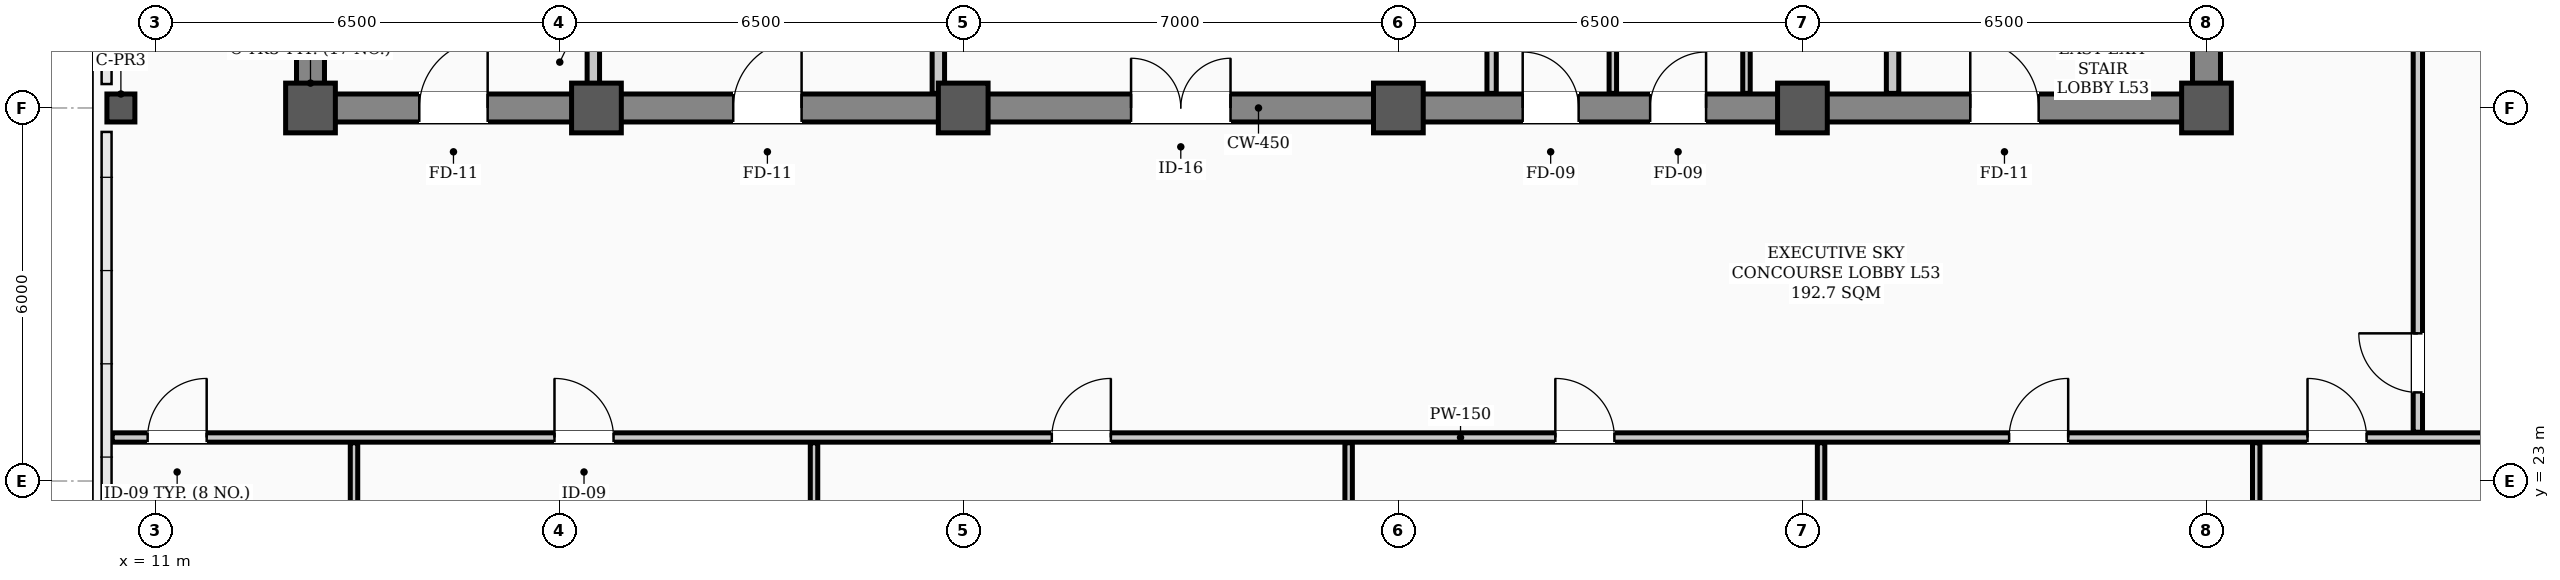
"""IFC4 building model, lengths in metres.
Left out: names, types, materials, properties, quantities, classifications, styles, units other than length and angle.
Written with IfcOpenShell. Run it as: python <this file> out.ifc"""

import sys

from ifc_helpers import new_model, si_unit, direction, frame, frame_2d, origin, origin_2d, place, context, subcontext, project, spatial, rectangle, hollow_rectangle, extrude, element, fill, save


model = new_model("IFC4")
c1 = context("Model", 3, precision=1e-05, world=origin(), true_north=direction((0.0, 1.0)))
c2 = subcontext(c1, "Body", "Model", "MODEL_VIEW")
j1 = project(units=[si_unit("LENGTHUNIT", "METRE"), si_unit("PLANEANGLEUNIT", "RADIAN")], contexts=[c1])
p1 = place(None, origin())
s1 = spatial("IfcSite", under=j1, at=p1, CompositionType="ELEMENT")
p2 = place(p1, origin())
s2 = spatial("IfcBuilding", under=s1, at=p2, CompositionType="ELEMENT")
p3 = place(p2, frame((0.0, 0.0, 215.0)))
s3 = spatial("IfcBuildingStorey", under=s2, at=p3, CompositionType="ELEMENT", Elevation=215.0)
for number, where, z_axis, x_axis in (
    (1, (13.5, 29.0, 0.0), (0.0, 0.0, 1.0), (1.0, 0.0, 0.0)),
    (2, (18.1, 29.0, 0.0), (0.0, 0.0, 1.0), (1.0, 0.0, 0.0)),
    (3, (24.0, 29.0, 0.0), (0.0, 0.0, 1.0), (1.0, 0.0, 0.0)),
    (4, (31.0, 29.0, 0.0), (0.0, 0.0, 1.0), (1.0, 0.0, 0.0)),
    (5, (37.5, 29.0, 0.0), (0.0, 0.0, 1.0), (1.0, 0.0, 0.0)),
    (6, (44.0, 29.0, 0.0), (0.0, 0.0, 1.0), (1.0, 0.0, 0.0)),
):
    element("IfcColumn", number, at=place(p3, frame(where, z_axis=z_axis, x_axis=x_axis)), inside=s3, PredefinedType="COLUMN", context=c2, shape_type="SweptSolid", body=[
        extrude(hollow_rectangle(XDim=0.8, YDim=0.8, WallThickness=0.032, InnerFilletRadius=0.016, OuterFilletRadius=0.048, at=origin_2d()), origin(), (0.0, 0.0, 1.0), 3.9),
    ])
p4 = place(p3, frame((10.45, 29.0, 0.0), z_axis=(0.0, 0.0, 1.0), x_axis=(1.0, 0.0, 0.0)))
e7 = element("IfcColumn", 7, at=p4, inside=s3, PredefinedType="COLUMN", context=c2, shape_type="SweptSolid", body=[
    extrude(hollow_rectangle(XDim=0.45, YDim=0.45, WallThickness=0.022, InnerFilletRadius=0.022, OuterFilletRadius=0.044, at=origin_2d()), origin(), (0.0, 0.0, 1.0), 3.9),
])
p5 = place(p3, frame((13.5, 29.0, 0.0), z_axis=(0.0, 0.0, 1.0), x_axis=(1.0, 0.0, 0.0)))
e8 = element("IfcWall", 8, at=p5, inside=s3, PredefinedType="SHEAR", context=c2, shape_type="SweptSolid", body=[
    extrude(rectangle(XDim=30.5, YDim=0.45, at=frame_2d((15.25, 0.0))), origin(), (0.0, 0.0, 1.0), 3.72),
])
p6 = place(p5, frame((1.75, 0.0, 0.0)))
e9 = element("IfcOpeningElement", 9, at=p6, cuts=e8, PredefinedType="OPENING", context=c2, shape_type="SweptSolid", body=[
    extrude(rectangle(XDim=1.1, YDim=2.08, at=frame_2d((0.55, 1.04))), frame((0.0, 0.235, 0.0), z_axis=(0.0, -1.0, 0.0), x_axis=(1.0, 0.0, 0.0)), (0.0, 0.0, 1.0), 0.47),
])
p7 = place(p5, frame((26.7, 0.0, 0.0)))
e10 = element("IfcOpeningElement", 10, at=p7, cuts=e8, PredefinedType="OPENING", context=c2, shape_type="SweptSolid", body=[
    extrude(rectangle(XDim=1.1, YDim=2.08, at=frame_2d((0.55, 1.04))), frame((0.0, 0.235, 0.0), z_axis=(0.0, -1.0, 0.0), x_axis=(1.0, 0.0, 0.0)), (0.0, 0.0, 1.0), 0.47),
])
p8 = place(p5, frame((6.8, 0.0, 0.0)))
e11 = element("IfcOpeningElement", 11, at=p8, cuts=e8, PredefinedType="OPENING", context=c2, shape_type="SweptSolid", body=[
    extrude(rectangle(XDim=1.1, YDim=2.08, at=frame_2d((0.55, 1.04))), frame((0.0, 0.235, 0.0), z_axis=(0.0, -1.0, 0.0), x_axis=(1.0, 0.0, 0.0)), (0.0, 0.0, 1.0), 0.47),
])
p9 = place(p5, frame((13.2, 0.0, 0.0)))
e12 = element("IfcOpeningElement", 12, at=p9, cuts=e8, PredefinedType="OPENING", context=c2, shape_type="SweptSolid", body=[
    extrude(rectangle(XDim=1.6, YDim=2.08, at=frame_2d((0.8, 1.04))), frame((0.0, 0.235, 0.0), z_axis=(0.0, -1.0, 0.0), x_axis=(1.0, 0.0, 0.0)), (0.0, 0.0, 1.0), 0.47),
])
p10 = place(p5, frame((19.5, 0.0, 0.0)))
e13 = element("IfcOpeningElement", 13, at=p10, cuts=e8, PredefinedType="OPENING", context=c2, shape_type="SweptSolid", body=[
    extrude(rectangle(XDim=0.9, YDim=2.08, at=frame_2d((0.45, 1.04))), frame((0.0, 0.235, 0.0), z_axis=(0.0, -1.0, 0.0), x_axis=(1.0, 0.0, 0.0)), (0.0, 0.0, 1.0), 0.47),
])
p11 = place(p5, frame((21.55, 0.0, 0.0)))
e14 = element("IfcOpeningElement", 14, at=p11, cuts=e8, PredefinedType="OPENING", context=c2, shape_type="SweptSolid", body=[
    extrude(rectangle(XDim=0.9, YDim=2.08, at=frame_2d((0.45, 1.04))), frame((0.0, 0.235, 0.0), z_axis=(0.0, -1.0, 0.0), x_axis=(1.0, 0.0, 0.0)), (0.0, 0.0, 1.0), 0.47),
])
for number, where, z_axis, x_axis in (
    (15, (13.5, 29.35, 0.0), (0.0, 0.0, 1.0), (0.0, 1.0, 0.0)),
    (16, (44.0, 29.35, 0.0), (0.0, 0.0, 1.0), (0.0, 1.0, 0.0)),
):
    element("IfcWall", number, at=place(p3, frame(where, z_axis=z_axis, x_axis=x_axis)), inside=s3, PredefinedType="SHEAR", context=c2, shape_type="SweptSolid", body=[
        extrude(rectangle(XDim=8.6, YDim=0.45, at=frame_2d((4.3, 0.0))), origin(), (0.0, 0.0, 1.0), 3.72),
    ])
p12 = place(p3, frame((10.31, 23.7, 0.0), z_axis=(0.0, 0.0, 1.0), x_axis=(1.0, 0.0, 0.0)))
e17 = element("IfcWall", 17, at=p12, inside=s3, PredefinedType="PARTITIONING", context=c2, shape_type="SweptSolid", body=[
    extrude(rectangle(XDim=43.38, YDim=0.15, at=frame_2d((21.69, 0.0))), origin(), (0.0, 0.0, 1.0), 3.2),
])
p13 = place(p12, frame((0.57, 0.0, 0.0)))
e18 = element("IfcOpeningElement", 18, at=p13, cuts=e17, PredefinedType="OPENING", context=c2, shape_type="SweptSolid", body=[
    extrude(rectangle(XDim=0.95, YDim=2.08, at=frame_2d((0.475, 1.04))), frame((0.0, 0.085, 0.0), z_axis=(0.0, -1.0, 0.0), x_axis=(1.0, 0.0, 0.0)), (0.0, 0.0, 1.0), 0.17),
])
p14 = place(p12, frame((7.115, 0.0, 0.0)))
e19 = element("IfcOpeningElement", 19, at=p14, cuts=e17, PredefinedType="OPENING", context=c2, shape_type="SweptSolid", body=[
    extrude(rectangle(XDim=0.95, YDim=2.08, at=frame_2d((0.475, 1.04))), frame((0.0, 0.085, 0.0), z_axis=(0.0, -1.0, 0.0), x_axis=(1.0, 0.0, 0.0)), (0.0, 0.0, 1.0), 0.17),
])
p15 = place(p12, frame((15.115, 0.0, 0.0)))
e20 = element("IfcOpeningElement", 20, at=p15, cuts=e17, PredefinedType="OPENING", context=c2, shape_type="SweptSolid", body=[
    extrude(rectangle(XDim=0.95, YDim=2.08, at=frame_2d((0.475, 1.04))), frame((0.0, 0.085, 0.0), z_axis=(0.0, -1.0, 0.0), x_axis=(1.0, 0.0, 0.0)), (0.0, 0.0, 1.0), 0.17),
])
p16 = place(p12, frame((23.215, 0.0, 0.0)))
e21 = element("IfcOpeningElement", 21, at=p16, cuts=e17, PredefinedType="OPENING", context=c2, shape_type="SweptSolid", body=[
    extrude(rectangle(XDim=0.95, YDim=2.08, at=frame_2d((0.475, 1.04))), frame((0.0, 0.085, 0.0), z_axis=(0.0, -1.0, 0.0), x_axis=(1.0, 0.0, 0.0)), (0.0, 0.0, 1.0), 0.17),
])
p17 = place(p12, frame((30.515, 0.0, 0.0)))
e22 = element("IfcOpeningElement", 22, at=p17, cuts=e17, PredefinedType="OPENING", context=c2, shape_type="SweptSolid", body=[
    extrude(rectangle(XDim=0.95, YDim=2.08, at=frame_2d((0.475, 1.04))), frame((0.0, 0.085, 0.0), z_axis=(0.0, -1.0, 0.0), x_axis=(1.0, 0.0, 0.0)), (0.0, 0.0, 1.0), 0.17),
])
p18 = place(p12, frame((35.315, 0.0, 0.0)))
e23 = element("IfcOpeningElement", 23, at=p18, cuts=e17, PredefinedType="OPENING", context=c2, shape_type="SweptSolid", body=[
    extrude(rectangle(XDim=0.95, YDim=2.08, at=frame_2d((0.475, 1.04))), frame((0.0, 0.085, 0.0), z_axis=(0.0, -1.0, 0.0), x_axis=(1.0, 0.0, 0.0)), (0.0, 0.0, 1.0), 0.17),
])
for number, where, z_axis, x_axis in (
    (24, (18.05, 29.235, 0.0), (0.0, 0.0, 1.0), (0.0, 1.0, 0.0)),
    (25, (38.95, 29.235, 0.0), (0.0, 0.0, 1.0), (0.0, 1.0, 0.0)),
):
    element("IfcWall", number, at=place(p3, frame(where, z_axis=z_axis, x_axis=x_axis)), inside=s3, PredefinedType="STANDARD", context=c2, shape_type="SweptSolid", body=[
        extrude(rectangle(XDim=1.065, YDim=0.2, at=frame_2d((0.532, 0.0))), origin(), (0.0, 0.0, 1.0), 3.35),
    ])
p19 = place(p3, frame((23.6, 29.235, 0.0), z_axis=(0.0, 0.0, 1.0), x_axis=(0.0, 1.0, 0.0)))
e26 = element("IfcWall", 26, at=p19, inside=s3, PredefinedType="STANDARD", context=c2, shape_type="SweptSolid", body=[
    extrude(rectangle(XDim=5.465, YDim=0.2, at=frame_2d((2.732, 0.0))), origin(), (0.0, 0.0, 1.0), 3.2),
])
p20 = place(p3, frame((32.5, 29.235, 0.0), z_axis=(0.0, 0.0, 1.0), x_axis=(0.0, 1.0, 0.0)))
e27 = element("IfcWall", 27, at=p20, inside=s3, PredefinedType="PARTITIONING", context=c2, shape_type="SweptSolid", body=[
    extrude(rectangle(XDim=2.53, YDim=0.15, at=frame_2d((1.265, 0.0))), origin(), (0.0, 0.0, 1.0), 3.35),
])
for number, where, z_axis, x_axis in (
    (28, (36.6, 29.235, 0.0), (0.0, 0.0, 1.0), (0.0, 1.0, 0.0)),
    (29, (34.45, 29.235, 0.0), (0.0, 0.0, 1.0), (0.0, 1.0, 0.0)),
):
    element("IfcWall", number, at=place(p3, frame(where, z_axis=z_axis, x_axis=x_axis)), inside=s3, PredefinedType="PARTITIONING", context=c2, shape_type="SweptSolid", body=[
        extrude(rectangle(XDim=2.53, YDim=0.12, at=frame_2d((1.265, 0.0))), origin(), (0.0, 0.0, 1.0), 3.35),
    ])
p21 = place(p3, frame((47.4, 23.785, 0.0), z_axis=(0.0, 0.0, 1.0), x_axis=(0.0, 1.0, 0.0)))
e30 = element("IfcWall", 30, at=p21, inside=s3, PredefinedType="PARTITIONING", context=c2, shape_type="SweptSolid", body=[
    extrude(rectangle(XDim=13.13, YDim=0.15, at=frame_2d((6.565, 0.0))), origin(), (0.0, 0.0, 1.0), 3.1),
])
p22 = place(p21, frame((0.64, 0.0, 0.0)))
e31 = element("IfcOpeningElement", 31, at=p22, cuts=e30, PredefinedType="OPENING", context=c2, shape_type="SweptSolid", body=[
    extrude(rectangle(XDim=0.95, YDim=2.08, at=frame_2d((0.475, 1.04))), frame((0.0, 0.085, 0.0), z_axis=(0.0, -1.0, 0.0), x_axis=(1.0, 0.0, 0.0)), (0.0, 0.0, 1.0), 0.17),
])
p23 = place(p3, frame((14.2, 11.56, 0.0), z_axis=(0.0, 0.0, 1.0), x_axis=(0.0, 1.0, 0.0)))
e32 = element("IfcWall", 32, at=p23, inside=s3, PredefinedType="PARTITIONING", context=c2, shape_type="SweptSolid", body=[
    extrude(rectangle(XDim=12.055, YDim=0.12, at=frame_2d((6.027, 0.0))), origin(), (0.0, 0.0, 1.0), 3.1),
])
p24 = place(p3, frame((21.6, 13.32, 0.0), z_axis=(0.0, 0.0, 1.0), x_axis=(0.0, 1.0, 0.0)))
e33 = element("IfcWall", 33, at=p24, inside=s3, PredefinedType="PARTITIONING", context=c2, shape_type="SweptSolid", body=[
    extrude(rectangle(XDim=10.295, YDim=0.12, at=frame_2d((5.147, 0.0))), origin(), (0.0, 0.0, 1.0), 3.1),
])
for number, where, z_axis, x_axis in (
    (34, (30.2, 11.56, 0.0), (0.0, 0.0, 1.0), (0.0, 1.0, 0.0)),
    (35, (37.8, 11.56, 0.0), (0.0, 0.0, 1.0), (0.0, 1.0, 0.0)),
    (36, (44.8, 11.56, 0.0), (0.0, 0.0, 1.0), (0.0, 1.0, 0.0)),
):
    element("IfcWall", number, at=place(p3, frame(where, z_axis=z_axis, x_axis=x_axis)), inside=s3, PredefinedType="PARTITIONING", context=c2, shape_type="SweptSolid", body=[
        extrude(rectangle(XDim=12.055, YDim=0.12, at=frame_2d((6.027, 0.0))), origin(), (0.0, 0.0, 1.0), 3.1),
    ])
p25 = place(p6, origin())
e37 = element("IfcDoor", 37, at=p25, inside=s3, OperationType="SINGLE_SWING_RIGHT", PredefinedType="DOOR", context=c2, shape_type="SweptSolid", body=[
    extrude(rectangle(XDim=1.1, YDim=2.08, at=frame_2d((0.55, 1.04))), frame((0.0, 0.025, 0.0), z_axis=(0.0, -1.0, 0.0), x_axis=(1.0, 0.0, 0.0)), (0.0, 0.0, 1.0), 0.05),
])
fill(e9, e37)
p26 = place(p7, origin())
e38 = element("IfcDoor", 38, at=p26, inside=s3, OperationType="SINGLE_SWING_LEFT", PredefinedType="DOOR", context=c2, shape_type="SweptSolid", body=[
    extrude(rectangle(XDim=1.1, YDim=2.08, at=frame_2d((0.55, 1.04))), frame((0.0, 0.025, 0.0), z_axis=(0.0, -1.0, 0.0), x_axis=(1.0, 0.0, 0.0)), (0.0, 0.0, 1.0), 0.05),
])
fill(e10, e38)
p27 = place(p8, origin())
e39 = element("IfcDoor", 39, at=p27, inside=s3, OperationType="SINGLE_SWING_RIGHT", PredefinedType="DOOR", context=c2, shape_type="SweptSolid", body=[
    extrude(rectangle(XDim=1.1, YDim=2.08, at=frame_2d((0.55, 1.04))), frame((0.0, 0.025, 0.0), z_axis=(0.0, -1.0, 0.0), x_axis=(1.0, 0.0, 0.0)), (0.0, 0.0, 1.0), 0.05),
])
fill(e11, e39)
p28 = place(p9, origin())
e40 = element("IfcDoor", 40, at=p28, inside=s3, OperationType="DOUBLE_DOOR_SINGLE_SWING", PredefinedType="DOOR", context=c2, shape_type="SweptSolid", body=[
    extrude(rectangle(XDim=1.6, YDim=2.08, at=frame_2d((0.8, 1.04))), frame((0.0, 0.025, 0.0), z_axis=(0.0, -1.0, 0.0), x_axis=(1.0, 0.0, 0.0)), (0.0, 0.0, 1.0), 0.05),
])
fill(e12, e40)
p29 = place(p10, origin())
e41 = element("IfcDoor", 41, at=p29, inside=s3, OperationType="SINGLE_SWING_LEFT", PredefinedType="DOOR", context=c2, shape_type="SweptSolid", body=[
    extrude(rectangle(XDim=0.9, YDim=2.08, at=frame_2d((0.45, 1.04))), frame((0.0, 0.025, 0.0), z_axis=(0.0, -1.0, 0.0), x_axis=(1.0, 0.0, 0.0)), (0.0, 0.0, 1.0), 0.05),
])
fill(e13, e41)
p30 = place(p11, origin())
e42 = element("IfcDoor", 42, at=p30, inside=s3, OperationType="SINGLE_SWING_RIGHT", PredefinedType="DOOR", context=c2, shape_type="SweptSolid", body=[
    extrude(rectangle(XDim=0.9, YDim=2.08, at=frame_2d((0.45, 1.04))), frame((0.0, 0.025, 0.0), z_axis=(0.0, -1.0, 0.0), x_axis=(1.0, 0.0, 0.0)), (0.0, 0.0, 1.0), 0.05),
])
fill(e14, e42)
p31 = place(p13, origin())
e43 = element("IfcDoor", 43, at=p31, inside=s3, OperationType="SINGLE_SWING_RIGHT", PredefinedType="DOOR", context=c2, shape_type="SweptSolid", body=[
    extrude(rectangle(XDim=0.95, YDim=2.08, at=frame_2d((0.475, 1.04))), frame((0.0, 0.025, 0.0), z_axis=(0.0, -1.0, 0.0), x_axis=(1.0, 0.0, 0.0)), (0.0, 0.0, 1.0), 0.05),
])
fill(e18, e43)
p32 = place(p14, origin())
e44 = element("IfcDoor", 44, at=p32, inside=s3, OperationType="SINGLE_SWING_LEFT", PredefinedType="DOOR", context=c2, shape_type="SweptSolid", body=[
    extrude(rectangle(XDim=0.95, YDim=2.08, at=frame_2d((0.475, 1.04))), frame((0.0, 0.025, 0.0), z_axis=(0.0, -1.0, 0.0), x_axis=(1.0, 0.0, 0.0)), (0.0, 0.0, 1.0), 0.05),
])
fill(e19, e44)
p33 = place(p15, origin())
e45 = element("IfcDoor", 45, at=p33, inside=s3, OperationType="SINGLE_SWING_RIGHT", PredefinedType="DOOR", context=c2, shape_type="SweptSolid", body=[
    extrude(rectangle(XDim=0.95, YDim=2.08, at=frame_2d((0.475, 1.04))), frame((0.0, 0.025, 0.0), z_axis=(0.0, -1.0, 0.0), x_axis=(1.0, 0.0, 0.0)), (0.0, 0.0, 1.0), 0.05),
])
fill(e20, e45)
p34 = place(p16, origin())
e46 = element("IfcDoor", 46, at=p34, inside=s3, OperationType="SINGLE_SWING_LEFT", PredefinedType="DOOR", context=c2, shape_type="SweptSolid", body=[
    extrude(rectangle(XDim=0.95, YDim=2.08, at=frame_2d((0.475, 1.04))), frame((0.0, 0.025, 0.0), z_axis=(0.0, -1.0, 0.0), x_axis=(1.0, 0.0, 0.0)), (0.0, 0.0, 1.0), 0.05),
])
fill(e21, e46)
p35 = place(p17, origin())
e47 = element("IfcDoor", 47, at=p35, inside=s3, OperationType="SINGLE_SWING_RIGHT", PredefinedType="DOOR", context=c2, shape_type="SweptSolid", body=[
    extrude(rectangle(XDim=0.95, YDim=2.08, at=frame_2d((0.475, 1.04))), frame((0.0, 0.025, 0.0), z_axis=(0.0, -1.0, 0.0), x_axis=(1.0, 0.0, 0.0)), (0.0, 0.0, 1.0), 0.05),
])
fill(e22, e47)
p36 = place(p18, origin())
e48 = element("IfcDoor", 48, at=p36, inside=s3, OperationType="SINGLE_SWING_LEFT", PredefinedType="DOOR", context=c2, shape_type="SweptSolid", body=[
    extrude(rectangle(XDim=0.95, YDim=2.08, at=frame_2d((0.475, 1.04))), frame((0.0, 0.025, 0.0), z_axis=(0.0, -1.0, 0.0), x_axis=(1.0, 0.0, 0.0)), (0.0, 0.0, 1.0), 0.05),
])
fill(e23, e48)
p37 = place(p22, origin())
e49 = element("IfcDoor", 49, at=p37, inside=s3, OperationType="SINGLE_SWING_RIGHT", PredefinedType="DOOR", context=c2, shape_type="SweptSolid", body=[
    extrude(rectangle(XDim=0.95, YDim=2.08, at=frame_2d((0.475, 1.04))), frame((0.0, 0.025, 0.0), z_axis=(0.0, -1.0, 0.0), x_axis=(1.0, 0.0, 0.0)), (0.0, 0.0, 1.0), 0.05),
])
fill(e31, e49)
save(model, sys.argv[1])
